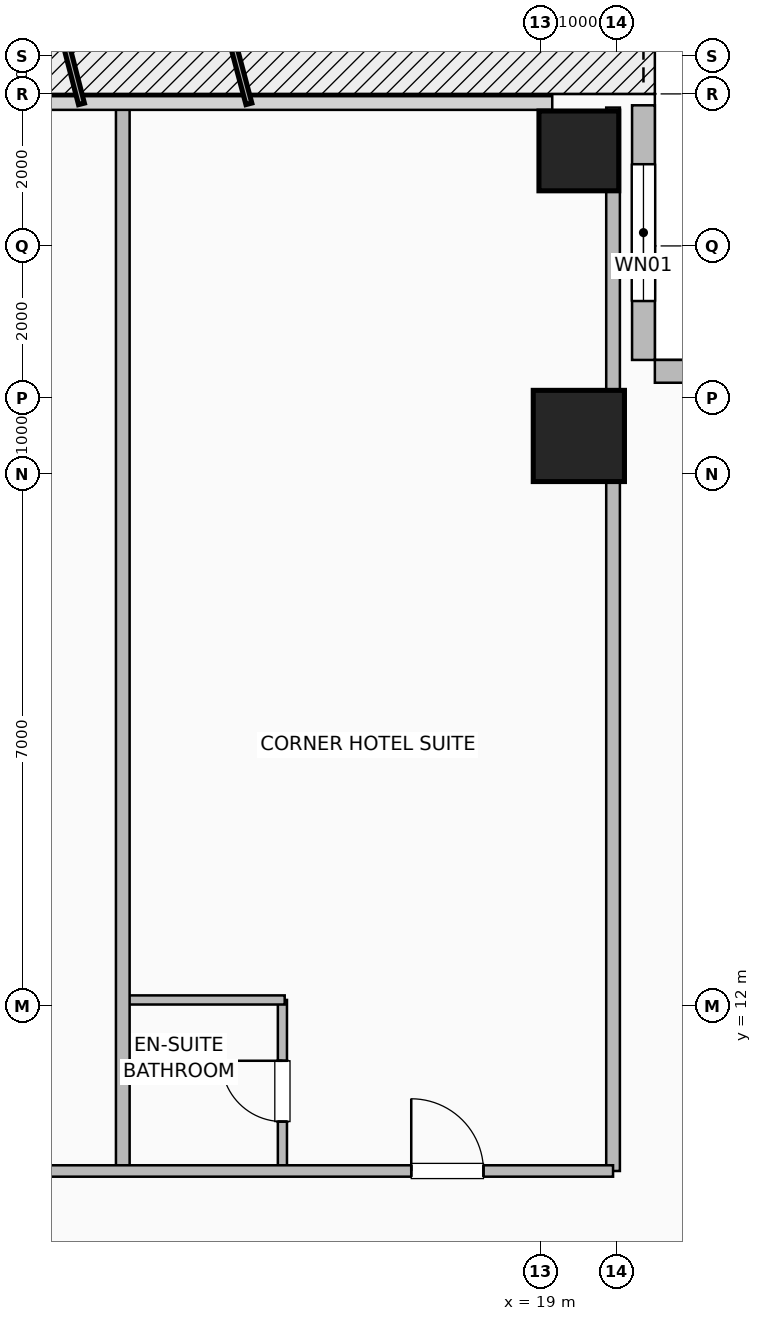
"""IFC4 building model, lengths in metres.
Left out: names, types, materials, properties, quantities, classifications, styles, units other than length and angle.
Written with IfcOpenShell. Run it as: python <this file> out.ifc"""

import sys

from ifc_helpers import new_model, si_unit, direction, frame, frame_2d, origin, origin_2d, place, context, subcontext, project, spatial, rectangle, hollow_rectangle, extrude, element, fill, save


model = new_model("IFC4")
c1 = context("Model", 3, precision=1e-05, world=origin(), true_north=direction((0.0, 1.0)))
c2 = subcontext(c1, "Body", "Model", "MODEL_VIEW")
j1 = project(units=[si_unit("LENGTHUNIT", "METRE"), si_unit("PLANEANGLEUNIT", "RADIAN")], contexts=[c1])
p1 = place(None, origin())
s1 = spatial("IfcSite", under=j1, at=p1, CompositionType="ELEMENT")
p2 = place(p1, origin())
s2 = spatial("IfcBuilding", under=s1, at=p2, CompositionType="ELEMENT")
p3 = place(p2, frame((0.0, 0.0, 27.0)))
s3 = spatial("IfcBuildingStorey", under=s2, at=p3, CompositionType="ELEMENT", Elevation=27.0)
p4 = place(p3, frame((19.5, 23.25, 0.0), z_axis=(0.0, 0.0, 1.0), x_axis=(1.0, 0.0, 0.0)))
e1 = element("IfcColumn", 1, at=p4, inside=s3, PredefinedType="COLUMN", context=c2, shape_type="SweptSolid", body=[
    extrude(hollow_rectangle(XDim=1.05, YDim=1.05, WallThickness=0.05, at=origin_2d()), origin(), (0.0, 0.0, 1.0), 3.5),
])
p5 = place(p3, frame((19.5, 19.5, 0.0), z_axis=(0.0, 0.0, 1.0), x_axis=(1.0, 0.0, 0.0)))
e2 = element("IfcColumn", 2, at=p5, inside=s3, PredefinedType="COLUMN", context=c2, shape_type="SweptSolid", body=[
    extrude(hollow_rectangle(XDim=1.2, YDim=1.2, WallThickness=0.055, at=origin_2d()), origin(), (0.0, 0.0, 1.0), 3.5),
])
p6 = place(p3, frame((20.35, 23.85, 0.0), z_axis=(0.0, 0.0, 1.0), x_axis=(0.0, -1.0, 0.0)))
e3 = element("IfcWall", 3, at=p6, inside=s3, PredefinedType="SOLIDWALL", context=c2, shape_type="SweptSolid", body=[
    extrude(rectangle(XDim=3.35, YDim=0.3, at=frame_2d((1.675, 0.0))), origin(), (0.0, 0.0, 1.0), 3.25),
])
p7 = place(p6, frame((0.775, 0.0, 0.9)))
e4 = element("IfcOpeningElement", 4, at=p7, cuts=e3, PredefinedType="OPENING", context=c2, shape_type="SweptSolid", body=[
    extrude(rectangle(XDim=1.8, YDim=1.8, at=frame_2d((0.9, 0.9))), frame((0.0, 0.16, 0.0), z_axis=(0.0, -1.0, 0.0), x_axis=(1.0, 0.0, 0.0)), (0.0, 0.0, 1.0), 0.32),
])
p8 = place(p3, frame((23.85, 20.35, 0.0), z_axis=(0.0, 0.0, 1.0), x_axis=(-1.0, 0.0, 0.0)))
e5 = element("IfcWall", 5, at=p8, inside=s3, PredefinedType="SOLIDWALL", context=c2, shape_type="SweptSolid", body=[
    extrude(rectangle(XDim=3.35, YDim=0.3, at=frame_2d((1.675, 0.0))), origin(), (0.0, 0.0, 1.0), 3.25),
])
p9 = place(p3, frame((15.6, 9.83, 0.0), z_axis=(0.0, 0.0, 1.0), x_axis=(0.0, 1.0, 0.0)))
e6 = element("IfcWall", 6, at=p9, inside=s3, PredefinedType="PLUMBINGWALL", context=c2, shape_type="SweptSolid", body=[
    extrude(rectangle(XDim=2.25, YDim=0.12, at=frame_2d((1.125, 0.0))), origin(), (0.0, 0.0, 1.0), 3.25),
])
p10 = place(p9, frame((0.65, 0.0, 0.0)))
e7 = element("IfcOpeningElement", 7, at=p10, cuts=e6, PredefinedType="OPENING", context=c2, shape_type="SweptSolid", body=[
    extrude(rectangle(XDim=0.8, YDim=2.05, at=frame_2d((0.4, 1.025))), frame((0.0, 0.07, 0.0), z_axis=(0.0, -1.0, 0.0), x_axis=(1.0, 0.0, 0.0)), (0.0, 0.0, 1.0), 0.14),
])
p11 = place(p3, frame((13.53, 12.08, 0.0), z_axis=(0.0, 0.0, 1.0), x_axis=(1.0, 0.0, 0.0)))
e8 = element("IfcWall", 8, at=p11, inside=s3, PredefinedType="PLUMBINGWALL", context=c2, shape_type="SweptSolid", body=[
    extrude(rectangle(XDim=2.1, YDim=0.12, at=frame_2d((1.05, 0.0))), origin(), (0.0, 0.0, 1.0), 3.25),
])
for number, where, z_axis, x_axis in (
    (9, (13.5, 9.83, 0.0), (0.0, 0.0, 1.0), (0.0, 1.0, 0.0)),
    (10, (19.95, 9.83, 0.0), (0.0, 0.0, 1.0), (0.0, 1.0, 0.0)),
):
    element("IfcWall", number, at=place(p3, frame(where, z_axis=z_axis, x_axis=x_axis)), inside=s3, PredefinedType="PARTITIONING", context=c2, shape_type="SweptSolid", body=[
        extrude(rectangle(XDim=13.99, YDim=0.18, at=frame_2d((6.995, 0.0))), origin(), (0.0, 0.0, 1.0), 3.25),
    ])
p12 = place(p3, frame((-19.95, 9.83, 0.0), z_axis=(0.0, 0.0, 1.0), x_axis=(1.0, 0.0, 0.0)))
e11 = element("IfcWall", 11, at=p12, inside=s3, PredefinedType="PARTITIONING", context=c2, shape_type="SweptSolid", body=[
    extrude(rectangle(XDim=39.9, YDim=0.15, at=frame_2d((19.95, 0.0))), origin(), (0.0, 0.0, 1.0), 3.25),
])
p13 = place(p12, frame((3.945, 0.0, 0.0)))
e12 = element("IfcOpeningElement", 12, at=p13, cuts=e11, PredefinedType="OPENING", context=c2, shape_type="SweptSolid", body=[
    extrude(rectangle(XDim=0.95, YDim=2.08, at=frame_2d((0.475, 1.04))), frame((0.0, 0.085, 0.0), z_axis=(0.0, -1.0, 0.0), x_axis=(1.0, 0.0, 0.0)), (0.0, 0.0, 1.0), 0.17),
])
p14 = place(p12, frame((10.02, 0.0, 0.0)))
e13 = element("IfcOpeningElement", 13, at=p14, cuts=e11, PredefinedType="OPENING", context=c2, shape_type="SweptSolid", body=[
    extrude(rectangle(XDim=0.95, YDim=2.08, at=frame_2d((0.475, 1.04))), frame((0.0, 0.085, 0.0), z_axis=(0.0, -1.0, 0.0), x_axis=(1.0, 0.0, 0.0)), (0.0, 0.0, 1.0), 0.17),
])
p15 = place(p12, frame((15.42, 0.0, 0.0)))
e14 = element("IfcOpeningElement", 14, at=p15, cuts=e11, PredefinedType="OPENING", context=c2, shape_type="SweptSolid", body=[
    extrude(rectangle(XDim=0.95, YDim=2.08, at=frame_2d((0.475, 1.04))), frame((0.0, 0.085, 0.0), z_axis=(0.0, -1.0, 0.0), x_axis=(1.0, 0.0, 0.0)), (0.0, 0.0, 1.0), 0.17),
])
p16 = place(p12, frame((20.702, 0.0, 0.0)))
e15 = element("IfcOpeningElement", 15, at=p16, cuts=e11, PredefinedType="OPENING", context=c2, shape_type="SweptSolid", body=[
    extrude(rectangle(XDim=0.95, YDim=2.08, at=frame_2d((0.475, 1.04))), frame((0.0, 0.085, 0.0), z_axis=(0.0, -1.0, 0.0), x_axis=(1.0, 0.0, 0.0)), (0.0, 0.0, 1.0), 0.17),
])
p17 = place(p12, frame((26.02, 0.0, 0.0)))
e16 = element("IfcOpeningElement", 16, at=p17, cuts=e11, PredefinedType="OPENING", context=c2, shape_type="SweptSolid", body=[
    extrude(rectangle(XDim=0.95, YDim=2.08, at=frame_2d((0.475, 1.04))), frame((0.0, 0.085, 0.0), z_axis=(0.0, -1.0, 0.0), x_axis=(1.0, 0.0, 0.0)), (0.0, 0.0, 1.0), 0.17),
])
p18 = place(p12, frame((31.37, 0.0, 0.0)))
e17 = element("IfcOpeningElement", 17, at=p18, cuts=e11, PredefinedType="OPENING", context=c2, shape_type="SweptSolid", body=[
    extrude(rectangle(XDim=0.95, YDim=2.08, at=frame_2d((0.475, 1.04))), frame((0.0, 0.085, 0.0), z_axis=(0.0, -1.0, 0.0), x_axis=(1.0, 0.0, 0.0)), (0.0, 0.0, 1.0), 0.17),
])
p19 = place(p12, frame((37.245, 0.0, 0.0)))
e18 = element("IfcOpeningElement", 18, at=p19, cuts=e11, PredefinedType="OPENING", context=c2, shape_type="SweptSolid", body=[
    extrude(rectangle(XDim=0.95, YDim=2.08, at=frame_2d((0.475, 1.04))), frame((0.0, 0.085, 0.0), z_axis=(0.0, -1.0, 0.0), x_axis=(1.0, 0.0, 0.0)), (0.0, 0.0, 1.0), 0.17),
])
p20 = place(p7, origin())
e19 = element("IfcWindow", 19, at=p20, inside=s3, PartitioningType="SINGLE_PANEL", PredefinedType="WINDOW", context=c2, shape_type="SweptSolid", body=[
    extrude(rectangle(XDim=1.8, YDim=1.8, at=frame_2d((0.9, 0.9))), frame((0.0, 0.03, 0.0), z_axis=(0.0, -1.0, 0.0), x_axis=(1.0, 0.0, 0.0)), (0.0, 0.0, 1.0), 0.06),
])
fill(e4, e19)
p21 = place(p10, origin())
e20 = element("IfcDoor", 20, at=p21, inside=s3, OperationType="SINGLE_SWING_RIGHT", PredefinedType="DOOR", context=c2, shape_type="SweptSolid", body=[
    extrude(rectangle(XDim=0.8, YDim=2.05, at=frame_2d((0.4, 1.025))), frame((0.0, 0.025, 0.0), z_axis=(0.0, -1.0, 0.0), x_axis=(1.0, 0.0, 0.0)), (0.0, 0.0, 1.0), 0.05),
])
fill(e7, e20)
p22 = place(p19, origin())
e21 = element("IfcDoor", 21, at=p22, inside=s3, OperationType="SINGLE_SWING_LEFT", PredefinedType="DOOR", context=c2, shape_type="SweptSolid", body=[
    extrude(rectangle(XDim=0.95, YDim=2.08, at=frame_2d((0.475, 1.04))), frame((0.0, 0.025, 0.0), z_axis=(0.0, -1.0, 0.0), x_axis=(1.0, 0.0, 0.0)), (0.0, 0.0, 1.0), 0.05),
])
fill(e18, e21)
save(model, sys.argv[1])
